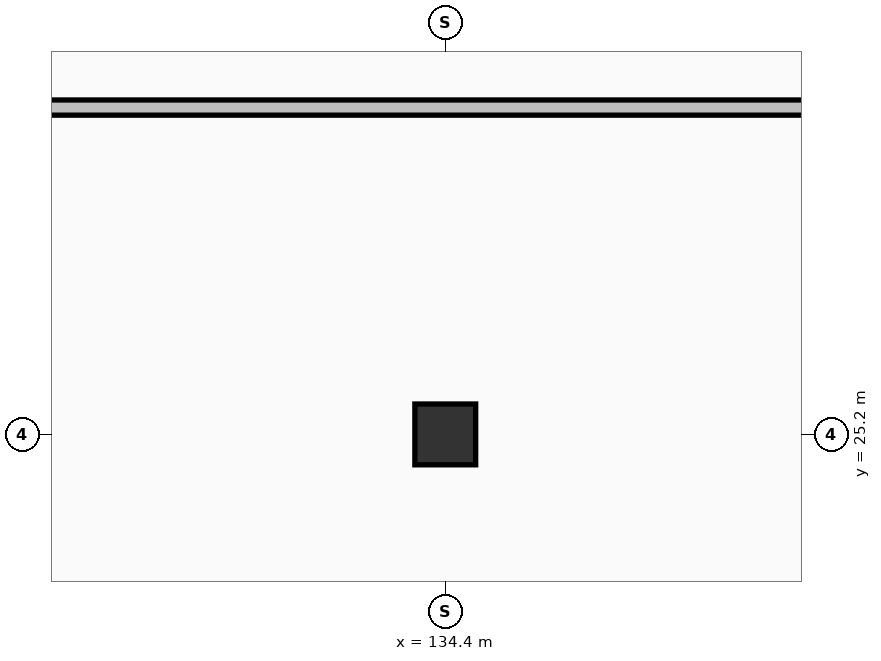
"""IFC4 building model, lengths in metres.
Left out: names, types, materials, properties, quantities, classifications, styles, units other than length and angle.
Written with IfcOpenShell. Run it as: python <this file> out.ifc"""

import sys

from ifc_helpers import new_model, si_unit, direction, frame, frame_2d, origin, origin_2d, place, context, subcontext, project, spatial, rectangle, extrude, element, save


model = new_model("IFC4")
c1 = context("Model", 3, precision=1e-05, world=origin(), true_north=direction((0.0, 1.0)))
c2 = subcontext(c1, "Body", "Model", "MODEL_VIEW")
j1 = project(units=[si_unit("LENGTHUNIT", "METRE"), si_unit("PLANEANGLEUNIT", "RADIAN")], contexts=[c1])
p1 = place(None, origin())
s1 = spatial("IfcSite", under=j1, at=p1, CompositionType="ELEMENT")
p2 = place(p1, origin())
s2 = spatial("IfcBuilding", under=s1, at=p2, CompositionType="ELEMENT")
p3 = place(p2, frame((0.0, 0.0, -4.2)))
s3 = spatial("IfcBuildingStorey", under=s2, at=p3, CompositionType="ELEMENT", Elevation=-4.2)
p4 = place(p3, frame((134.4, 25.2, 0.0), z_axis=(0.0, 0.0, 1.0), x_axis=(1.0, 0.0, 0.0)))
e1 = element("IfcColumn", 1, at=p4, inside=s3, PredefinedType="COLUMN", context=c2, shape_type="SweptSolid", body=[
    extrude(rectangle(XDim=0.8, YDim=0.8, at=origin_2d()), origin(), (0.0, 0.0, 1.0), 4.2),
])
p5 = place(p3, frame((91.8, 29.5, 0.0), z_axis=(0.0, 0.0, 1.0), x_axis=(1.0, 0.0, 0.0)))
e2 = element("IfcWall", 2, at=p5, inside=s3, PredefinedType="SOLIDWALL", context=c2, shape_type="SweptSolid", body=[
    extrude(rectangle(XDim=68.4, YDim=0.2, at=frame_2d((34.2, 0.0))), origin(), (0.0, 0.0, 1.0), 3.85),
])
p6 = place(p5, frame((14.0, 0.0, 0.0)))
e3 = element("IfcOpeningElement", 3, at=p6, cuts=e2, PredefinedType="OPENING", context=c2, shape_type="SweptSolid", body=[
    extrude(rectangle(XDim=1.65, YDim=2.25, at=frame_2d((0.825, 1.125))), frame((0.0, 0.11, 0.0), z_axis=(0.0, -1.0, 0.0), x_axis=(1.0, 0.0, 0.0)), (0.0, 0.0, 1.0), 0.22),
])
p7 = place(p5, frame((48.0, 0.0, 0.0)))
e4 = element("IfcOpeningElement", 4, at=p7, cuts=e2, PredefinedType="OPENING", context=c2, shape_type="SweptSolid", body=[
    extrude(rectangle(XDim=1.65, YDim=2.25, at=frame_2d((0.825, 1.125))), frame((0.0, 0.11, 0.0), z_axis=(0.0, -1.0, 0.0), x_axis=(1.0, 0.0, 0.0)), (0.0, 0.0, 1.0), 0.22),
])
save(model, sys.argv[1])
